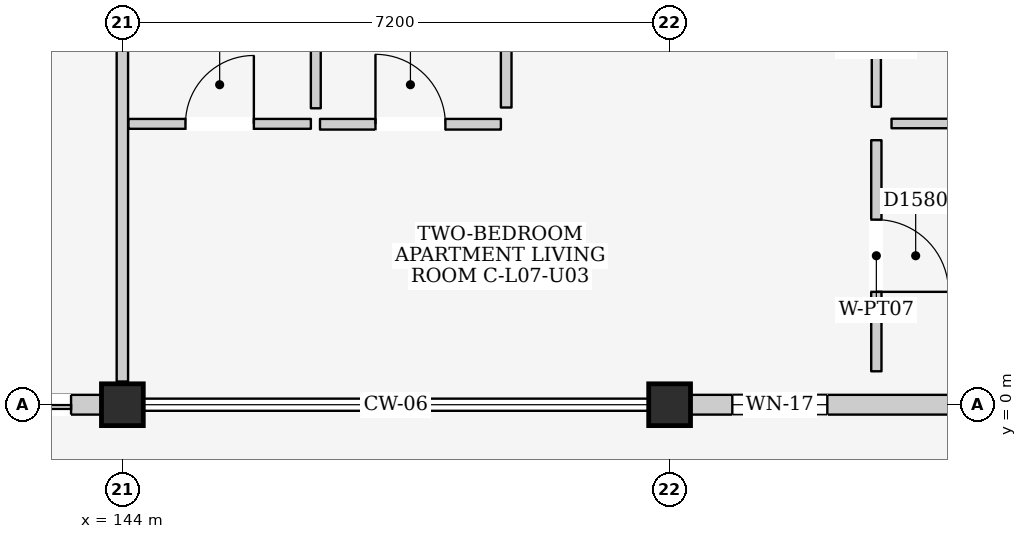
"""IFC4 building model, lengths in metres.
Left out: names, types, materials, properties, quantities, classifications, styles, units other than length and angle.
Written with IfcOpenShell. Run it as: python <this file> out.ifc"""

import sys

from ifc_helpers import new_model, si_unit, direction, frame, frame_2d, origin, origin_2d, place, context, subcontext, project, spatial, rectangle, extrude, element, fill, save


model = new_model("IFC4")
c1 = context("Model", 3, precision=1e-05, world=origin(), true_north=direction((0.0, 1.0)))
c2 = subcontext(c1, "Body", "Model", "MODEL_VIEW")
j1 = project(units=[si_unit("LENGTHUNIT", "METRE"), si_unit("PLANEANGLEUNIT", "RADIAN")], contexts=[c1])
p1 = place(None, origin())
s1 = spatial("IfcSite", under=j1, at=p1, CompositionType="ELEMENT")
p2 = place(p1, origin())
s2 = spatial("IfcBuilding", under=s1, at=p2, CompositionType="ELEMENT")
p3 = place(p2, frame((0.0, 0.0, 25.1)))
s3 = spatial("IfcBuildingStorey", under=s2, at=p3, CompositionType="ELEMENT", Elevation=25.1)
for number, where, z_axis, x_axis in (
    (1, (144.0, 0.0, 0.0), (0.0, 0.0, 1.0), (1.0, 0.0, 0.0)),
    (2, (151.2, 0.0, 0.0), (0.0, 0.0, 1.0), (1.0, 0.0, 0.0)),
):
    element("IfcColumn", number, at=place(p3, frame(where, z_axis=z_axis, x_axis=x_axis)), inside=s3, PredefinedType="COLUMN", context=c2, shape_type="SweptSolid", body=[
        extrude(rectangle(XDim=0.55, YDim=0.55, at=origin_2d()), origin(), (0.0, 0.0, 1.0), 3.2),
    ])
p4 = place(p3, frame((137.075, 0.0, 0.0), z_axis=(0.0, 0.0, 1.0), x_axis=(1.0, 0.0, 0.0)))
e3 = element("IfcWall", 3, at=p4, inside=s3, PredefinedType="ELEMENTEDWALL", context=c2, shape_type="SweptSolid", body=[
    extrude(rectangle(XDim=6.65, YDim=0.26, at=frame_2d((3.325, 0.0))), origin(), (0.0, 0.0, 1.0), 2.525),
])
p5 = place(p4, frame((3.85, 0.0, 0.0)))
e4 = element("IfcOpeningElement", 4, at=p5, cuts=e3, PredefinedType="OPENING", context=c2, shape_type="SweptSolid", body=[
    extrude(rectangle(XDim=2.4, YDim=2.12, at=frame_2d((1.2, 1.06))), frame((0.0, 0.145, 0.0), z_axis=(0.0, -1.0, 0.0), x_axis=(1.0, 0.0, 0.0)), (0.0, 0.0, 1.0), 0.29),
])
p6 = place(p4, frame((0.55, 0.0, 0.9)))
e5 = element("IfcOpeningElement", 5, at=p6, cuts=e3, PredefinedType="OPENING", context=c2, shape_type="SweptSolid", body=[
    extrude(rectangle(XDim=1.7, YDim=1.45, at=frame_2d((0.85, 0.725))), frame((0.0, 0.145, 0.0), z_axis=(0.0, -1.0, 0.0), x_axis=(1.0, 0.0, 0.0)), (0.0, 0.0, 1.0), 0.29),
])
p7 = place(p3, frame((151.475, 0.0, 0.0), z_axis=(0.0, 0.0, 1.0), x_axis=(1.0, 0.0, 0.0)))
e6 = element("IfcWall", 6, at=p7, inside=s3, PredefinedType="ELEMENTEDWALL", context=c2, shape_type="SweptSolid", body=[
    extrude(rectangle(XDim=6.65, YDim=0.26, at=frame_2d((3.325, 0.0))), origin(), (0.0, 0.0, 1.0), 2.525),
])
p8 = place(p7, frame((3.85, 0.0, 0.0)))
e7 = element("IfcOpeningElement", 7, at=p8, cuts=e6, PredefinedType="OPENING", context=c2, shape_type="SweptSolid", body=[
    extrude(rectangle(XDim=1.4, YDim=2.1, at=frame_2d((0.7, 1.05))), frame((0.0, 0.145, 0.0), z_axis=(0.0, -1.0, 0.0), x_axis=(1.0, 0.0, 0.0)), (0.0, 0.0, 1.0), 0.29),
])
p9 = place(p7, frame((0.55, 0.0, 0.9)))
e8 = element("IfcOpeningElement", 8, at=p9, cuts=e6, PredefinedType="OPENING", context=c2, shape_type="SweptSolid", body=[
    extrude(rectangle(XDim=1.25, YDim=1.3, at=frame_2d((0.625, 0.65))), frame((0.0, 0.145, 0.0), z_axis=(0.0, -1.0, 0.0), x_axis=(1.0, 0.0, 0.0)), (0.0, 0.0, 1.0), 0.29),
])
p10 = place(p3, frame((144.0, 0.305, 0.0), z_axis=(0.0, 0.0, 1.0), x_axis=(0.0, 1.0, 0.0)))
e9 = element("IfcWall", 9, at=p10, inside=s3, PredefinedType="PARTITIONING", context=c2, shape_type="SweptSolid", body=[
    extrude(rectangle(XDim=6.59, YDim=0.15, at=frame_2d((3.295, 0.0))), origin(), (0.0, 0.0, 1.0), 2.475),
])
p11 = place(p3, frame((144.08, 3.695, 0.0), z_axis=(0.0, 0.0, 1.0), x_axis=(1.0, 0.0, 0.0)))
e10 = element("IfcWall", 10, at=p11, inside=s3, PredefinedType="PARTITIONING", context=c2, shape_type="SweptSolid", body=[
    extrude(rectangle(XDim=2.4, YDim=0.13, at=frame_2d((1.2, 0.0))), origin(), (0.0, 0.0, 1.0), 2.99),
])
p12 = place(p11, frame((0.75, 0.0, 0.0)))
e11 = element("IfcOpeningElement", 11, at=p12, cuts=e10, PredefinedType="OPENING", context=c2, shape_type="SweptSolid", body=[
    extrude(rectangle(XDim=0.9, YDim=2.1, at=frame_2d((0.45, 1.05))), frame((0.0, 0.08, 0.0), z_axis=(0.0, -1.0, 0.0), x_axis=(1.0, 0.0, 0.0)), (0.0, 0.0, 1.0), 0.16),
])
p13 = place(p3, frame((146.545, 3.9, 0.0), z_axis=(0.0, 0.0, 1.0), x_axis=(0.0, 1.0, 0.0)))
e12 = element("IfcWall", 12, at=p13, inside=s3, PredefinedType="PARTITIONING", context=c2, shape_type="SweptSolid", body=[
    extrude(rectangle(XDim=3.04, YDim=0.13, at=frame_2d((1.52, 0.0))), origin(), (0.0, 0.0, 1.0), 2.99),
])
p14 = place(p3, frame((146.6, 3.69, 0.0), z_axis=(0.0, 0.0, 1.0), x_axis=(1.0, 0.0, 0.0)))
e13 = element("IfcWall", 13, at=p14, inside=s3, PredefinedType="PARTITIONING", context=c2, shape_type="SweptSolid", body=[
    extrude(rectangle(XDim=2.38, YDim=0.14, at=frame_2d((1.19, 0.0))), origin(), (0.0, 0.0, 1.0), 2.99),
])
p15 = place(p14, frame((0.73, 0.0, 0.0)))
e14 = element("IfcOpeningElement", 14, at=p15, cuts=e13, PredefinedType="OPENING", context=c2, shape_type="SweptSolid", body=[
    extrude(rectangle(XDim=0.92, YDim=2.1, at=frame_2d((0.46, 1.05))), frame((0.0, 0.085, 0.0), z_axis=(0.0, -1.0, 0.0), x_axis=(1.0, 0.0, 0.0)), (0.0, 0.0, 1.0), 0.17),
])
p16 = place(p3, frame((149.05, 3.91, 0.0), z_axis=(0.0, 0.0, 1.0), x_axis=(0.0, 1.0, 0.0)))
e15 = element("IfcWall", 15, at=p16, inside=s3, PredefinedType="PARTITIONING", context=c2, shape_type="SweptSolid", body=[
    extrude(rectangle(XDim=3.06, YDim=0.14, at=frame_2d((1.53, 0.0))), origin(), (0.0, 0.0, 1.0), 2.99),
])
p17 = place(p3, frame((153.92, 0.44, 0.0), z_axis=(0.0, 0.0, 1.0), x_axis=(0.0, 1.0, 0.0)))
e16 = element("IfcWall", 16, at=p17, inside=s3, PredefinedType="PARTITIONING", context=c2, shape_type="SweptSolid", body=[
    extrude(rectangle(XDim=3.04, YDim=0.135, at=frame_2d((1.52, 0.0))), origin(), (0.0, 0.0, 1.0), 2.99),
])
p18 = place(p17, frame((1.045, 0.0, 0.0)))
e17 = element("IfcOpeningElement", 17, at=p18, cuts=e16, PredefinedType="OPENING", context=c2, shape_type="SweptSolid", body=[
    extrude(rectangle(XDim=0.95, YDim=2.15, at=frame_2d((0.475, 1.075))), frame((0.0, 0.083, 0.0), z_axis=(0.0, -1.0, 0.0), x_axis=(1.0, 0.0, 0.0)), (0.0, 0.0, 1.0), 0.165),
])
p19 = place(p3, frame((154.12, 3.7, 0.0), z_axis=(0.0, 0.0, 1.0), x_axis=(1.0, 0.0, 0.0)))
e18 = element("IfcWall", 18, at=p19, inside=s3, PredefinedType="PARTITIONING", context=c2, shape_type="SweptSolid", body=[
    extrude(rectangle(XDim=4.06, YDim=0.125, at=frame_2d((2.03, 0.0))), origin(), (0.0, 0.0, 1.0), 2.99),
])
p20 = place(p3, frame((153.92, 3.92, 0.0), z_axis=(0.0, 0.0, 1.0), x_axis=(0.0, 1.0, 0.0)))
e19 = element("IfcWall", 19, at=p20, inside=s3, PredefinedType="PARTITIONING", context=c2, shape_type="SweptSolid", body=[
    extrude(rectangle(XDim=3.04, YDim=0.12, at=frame_2d((1.52, 0.0))), origin(), (0.0, 0.0, 1.0), 2.99),
])
p21 = place(p20, frame((1.04, 0.0, 0.0)))
e20 = element("IfcOpeningElement", 20, at=p21, cuts=e19, PredefinedType="OPENING", context=c2, shape_type="SweptSolid", body=[
    extrude(rectangle(XDim=0.96, YDim=2.15, at=frame_2d((0.48, 1.075))), frame((0.0, 0.075, 0.0), z_axis=(0.0, -1.0, 0.0), x_axis=(1.0, 0.0, 0.0)), (0.0, 0.0, 1.0), 0.15),
])
p22 = place(p5, frame((2.4, 0.0, 0.0), z_axis=(0.0, 0.0, 1.0), x_axis=(-1.0, 0.0, 0.0)))
e21 = element("IfcDoor", 21, at=p22, inside=s3, OperationType="DOUBLE_DOOR_SLIDING", PredefinedType="DOOR", context=c2, shape_type="SweptSolid", body=[
    extrude(rectangle(XDim=2.4, YDim=2.12, at=frame_2d((1.2, 1.06))), frame((0.0, 0.025, 0.0), z_axis=(0.0, -1.0, 0.0), x_axis=(1.0, 0.0, 0.0)), (0.0, 0.0, 1.0), 0.05),
])
fill(e4, e21)
p23 = place(p9, origin())
e22 = element("IfcWindow", 22, at=p23, inside=s3, PartitioningType="SINGLE_PANEL", PredefinedType="WINDOW", context=c2, shape_type="SweptSolid", body=[
    extrude(rectangle(XDim=1.25, YDim=1.3, at=frame_2d((0.625, 0.65))), frame((0.0, 0.03, 0.0), z_axis=(0.0, -1.0, 0.0), x_axis=(1.0, 0.0, 0.0)), (0.0, 0.0, 1.0), 0.06),
])
fill(e8, e22)
p24 = place(p12, origin())
e23 = element("IfcDoor", 23, at=p24, inside=s3, OperationType="SINGLE_SWING_RIGHT", PredefinedType="DOOR", context=c2, shape_type="SweptSolid", body=[
    extrude(rectangle(XDim=0.9, YDim=2.1, at=frame_2d((0.45, 1.05))), frame((0.0, 0.025, 0.0), z_axis=(0.0, -1.0, 0.0), x_axis=(1.0, 0.0, 0.0)), (0.0, 0.0, 1.0), 0.05),
])
fill(e11, e23)
p25 = place(p15, origin())
e24 = element("IfcDoor", 24, at=p25, inside=s3, OperationType="SINGLE_SWING_LEFT", PredefinedType="DOOR", context=c2, shape_type="SweptSolid", body=[
    extrude(rectangle(XDim=0.92, YDim=2.1, at=frame_2d((0.46, 1.05))), frame((0.0, 0.025, 0.0), z_axis=(0.0, -1.0, 0.0), x_axis=(1.0, 0.0, 0.0)), (0.0, 0.0, 1.0), 0.05),
])
fill(e14, e24)
p26 = place(p18, frame((0.95, 0.0, 0.0), z_axis=(0.0, 0.0, 1.0), x_axis=(-1.0, 0.0, 0.0)))
e25 = element("IfcDoor", 25, at=p26, inside=s3, OperationType="SINGLE_SWING_RIGHT", PredefinedType="DOOR", context=c2, shape_type="SweptSolid", body=[
    extrude(rectangle(XDim=0.95, YDim=2.15, at=frame_2d((0.475, 1.075))), frame((0.0, 0.025, 0.0), z_axis=(0.0, -1.0, 0.0), x_axis=(1.0, 0.0, 0.0)), (0.0, 0.0, 1.0), 0.05),
])
fill(e17, e25)
save(model, sys.argv[1])
